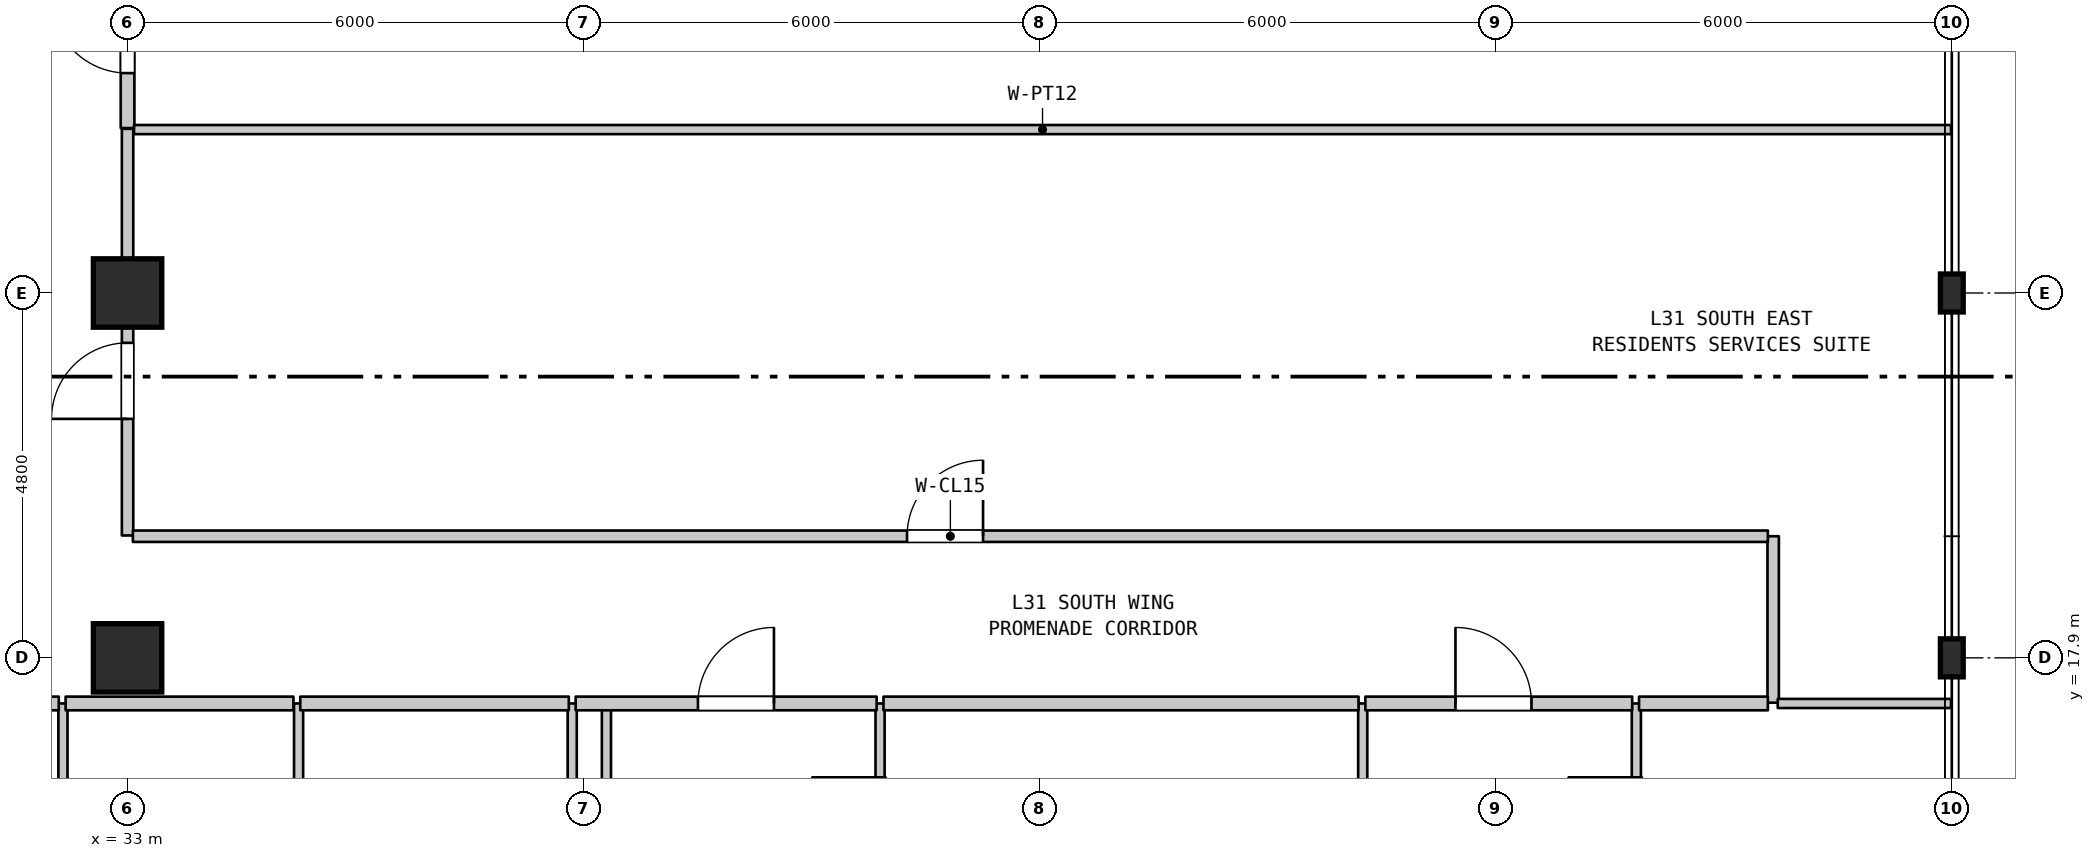
"""IFC4 building model, lengths in metres.
Left out: names, types, materials, properties, quantities, classifications, styles, units other than length and angle.
Written with IfcOpenShell. Run it as: python <this file> out.ifc"""

import sys

from ifc_helpers import new_model, si_unit, direction, frame, frame_2d, origin, origin_2d, place, context, subcontext, project, spatial, rectangle, i_section, extrude, element, fill, save


model = new_model("IFC4")
c1 = context("Model", 3, precision=1e-05, world=origin(), true_north=direction((0.0, 1.0)))
c2 = subcontext(c1, "Body", "Model", "MODEL_VIEW")
j1 = project(units=[si_unit("LENGTHUNIT", "METRE"), si_unit("PLANEANGLEUNIT", "RADIAN")], contexts=[c1])
p1 = place(None, origin())
s1 = spatial("IfcSite", under=j1, at=p1, CompositionType="ELEMENT")
p2 = place(p1, origin())
s2 = spatial("IfcBuilding", under=s1, at=p2, CompositionType="ELEMENT")
p3 = place(p2, frame((0.0, 0.0, 129.8)))
s3 = spatial("IfcBuildingStorey", under=s2, at=p3, CompositionType="ELEMENT", Elevation=129.8)
for number, where, z_axis, x_axis in (
    (1, (33.0, 17.9, 0.0), (0.0, 0.0, 1.0), (1.0, 0.0, 0.0)),
    (2, (33.0, 22.7, 0.0), (0.0, 0.0, 1.0), (1.0, 0.0, 0.0)),
):
    element("IfcColumn", number, at=place(p3, frame(where, z_axis=z_axis, x_axis=x_axis)), inside=s3, PredefinedType="COLUMN", context=c2, shape_type="SweptSolid", body=[
        extrude(rectangle(XDim=0.9, YDim=0.9, at=origin_2d()), origin(), (0.0, 0.0, 1.0), 3.7),
    ])
for number, where, z_axis, x_axis in (
    (3, (57.0, 17.9, 0.0), (0.0, 0.0, 1.0), (1.0, 0.0, 0.0)),
    (4, (57.0, 22.7, 0.0), (0.0, 0.0, 1.0), (1.0, 0.0, 0.0)),
):
    element("IfcColumn", number, at=place(p3, frame(where, z_axis=z_axis, x_axis=x_axis)), inside=s3, PredefinedType="COLUMN", context=c2, shape_type="SweptSolid", body=[
        extrude(i_section(OverallWidth=0.3, OverallDepth=0.5, WebThickness=0.014, FlangeThickness=0.028, FilletRadius=0.027, at=origin_2d()), origin(), (0.0, 0.0, 1.0), 3.7),
    ])
p4 = place(p3, frame((32.15, 11.15, 0.0), z_axis=(0.0, 0.0, 1.0), x_axis=(0.0, 1.0, 0.0)))
e5 = element("IfcWall", 5, at=p4, inside=s3, PredefinedType="PARTITIONING", context=c2, shape_type="SweptSolid", body=[
    extrude(rectangle(XDim=6.15, YDim=0.12, at=frame_2d((3.075, 0.0))), origin(), (0.0, 0.0, 1.0), 3.385),
])
p5 = place(p3, frame((33.0, 19.51, 0.0), z_axis=(0.0, 0.0, 1.0), x_axis=(0.0, 1.0, 0.0)))
e6 = element("IfcWall", 6, at=p5, inside=s3, PredefinedType="STANDARD", context=c2, shape_type="SweptSolid", body=[
    extrude(rectangle(XDim=5.35, YDim=0.15, at=frame_2d((2.675, 0.0))), origin(), (0.0, 0.0, 1.0), 2.935),
])
p6 = place(p5, frame((1.534, 0.0, 0.0)))
e7 = element("IfcOpeningElement", 7, at=p6, cuts=e6, PredefinedType="OPENING", context=c2, shape_type="SweptSolid", body=[
    extrude(rectangle(XDim=1.0, YDim=2.15, at=frame_2d((0.5, 1.075))), frame((0.0, 0.085, 0.0), z_axis=(0.0, -1.0, 0.0), x_axis=(1.0, 0.0, 0.0)), (0.0, 0.0, 1.0), 0.17),
])
p7 = place(p3, frame((33.0, 24.87, 0.0), z_axis=(0.0, 0.0, 1.0), x_axis=(0.0, 1.0, 0.0)))
e8 = element("IfcWall", 8, at=p7, inside=s3, PredefinedType="STANDARD", context=c2, shape_type="SweptSolid", body=[
    extrude(rectangle(XDim=2.6, YDim=0.18, at=frame_2d((1.3, 0.0))), origin(), (0.0, 0.0, 1.0), 2.935),
])
p8 = place(p7, frame((0.723, 0.0, 0.0)))
e9 = element("IfcOpeningElement", 9, at=p8, cuts=e8, PredefinedType="OPENING", context=c2, shape_type="SweptSolid", body=[
    extrude(rectangle(XDim=1.0, YDim=2.15, at=frame_2d((0.5, 1.075))), frame((0.0, 0.1, 0.0), z_axis=(0.0, -1.0, 0.0), x_axis=(1.0, 0.0, 0.0)), (0.0, 0.0, 1.0), 0.2),
])
for number, where, z_axis, x_axis in (
    (10, (35.25, 11.15, 0.0), (0.0, 0.0, 1.0), (0.0, 1.0, 0.0)),
    (11, (38.85, 11.15, 0.0), (0.0, 0.0, 1.0), (0.0, 1.0, 0.0)),
):
    element("IfcWall", number, at=place(p3, frame(where, z_axis=z_axis, x_axis=x_axis)), inside=s3, PredefinedType="PARTITIONING", context=c2, shape_type="SweptSolid", body=[
        extrude(rectangle(XDim=6.15, YDim=0.12, at=frame_2d((3.075, 0.0))), origin(), (0.0, 0.0, 1.0), 3.385),
    ])
p9 = place(p3, frame((39.3, 0.71, 0.0), z_axis=(0.0, 0.0, 1.0), x_axis=(0.0, 1.0, 0.0)))
e12 = element("IfcWall", 12, at=p9, inside=s3, PredefinedType="PARTITIONING", context=c2, shape_type="SweptSolid", body=[
    extrude(rectangle(XDim=16.59, YDim=0.12, at=frame_2d((8.295, 0.0))), origin(), (0.0, 0.0, 1.0), 3.385),
])
p10 = place(p3, frame((42.9, 14.6, 0.0), z_axis=(0.0, 0.0, 1.0), x_axis=(0.0, 1.0, 0.0)))
e13 = element("IfcWall", 13, at=p10, inside=s3, PredefinedType="PARTITIONING", context=c2, shape_type="SweptSolid", body=[
    extrude(rectangle(XDim=2.7, YDim=0.12, at=frame_2d((1.35, 0.0))), origin(), (0.0, 0.0, 1.0), 3.385),
])
p11 = place(p10, frame((0.828, 0.0, 0.0)))
e14 = element("IfcOpeningElement", 14, at=p11, cuts=e13, PredefinedType="OPENING", context=c2, shape_type="SweptSolid", body=[
    extrude(rectangle(XDim=0.9, YDim=2.1, at=frame_2d((0.45, 1.05))), frame((0.0, 0.07, 0.0), z_axis=(0.0, -1.0, 0.0), x_axis=(1.0, 0.0, 0.0)), (0.0, 0.0, 1.0), 0.14),
])
p12 = place(p3, frame((49.25, 14.6, 0.0), z_axis=(0.0, 0.0, 1.0), x_axis=(0.0, 1.0, 0.0)))
e15 = element("IfcWall", 15, at=p12, inside=s3, PredefinedType="PARTITIONING", context=c2, shape_type="SweptSolid", body=[
    extrude(rectangle(XDim=2.7, YDim=0.12, at=frame_2d((1.35, 0.0))), origin(), (0.0, 0.0, 1.0), 3.385),
])
p13 = place(p3, frame((52.85, 14.6, 0.0), z_axis=(0.0, 0.0, 1.0), x_axis=(0.0, 1.0, 0.0)))
e16 = element("IfcWall", 16, at=p13, inside=s3, PredefinedType="PARTITIONING", context=c2, shape_type="SweptSolid", body=[
    extrude(rectangle(XDim=2.7, YDim=0.12, at=frame_2d((1.35, 0.0))), origin(), (0.0, 0.0, 1.0), 3.385),
])
p14 = place(p13, frame((0.828, 0.0, 0.0)))
e17 = element("IfcOpeningElement", 17, at=p14, cuts=e16, PredefinedType="OPENING", context=c2, shape_type="SweptSolid", body=[
    extrude(rectangle(XDim=0.9, YDim=2.1, at=frame_2d((0.45, 1.05))), frame((0.0, 0.07, 0.0), z_axis=(0.0, -1.0, 0.0), x_axis=(1.0, 0.0, 0.0)), (0.0, 0.0, 1.0), 0.14),
])
p15 = place(p3, frame((54.65, 17.31, 0.0), z_axis=(0.0, 0.0, 1.0), x_axis=(0.0, 1.0, 0.0)))
e18 = element("IfcWall", 18, at=p15, inside=s3, PredefinedType="STANDARD", context=c2, shape_type="SweptSolid", body=[
    extrude(rectangle(XDim=2.19, YDim=0.15, at=frame_2d((1.095, 0.0))), origin(), (0.0, 0.0, 1.0), 3.385),
])
p16 = place(p3, frame((27.645, 17.3, 0.0), z_axis=(0.0, 0.0, 1.0), x_axis=(1.0, 0.0, 0.0)))
e19 = element("IfcWall", 19, at=p16, inside=s3, PredefinedType="STANDARD", context=c2, shape_type="SweptSolid", body=[
    extrude(rectangle(XDim=4.45, YDim=0.18, at=frame_2d((2.225, 0.0))), origin(), (0.0, 0.0, 1.0), 3.385),
])
p17 = place(p16, frame((1.653, 0.0, 0.0)))
e20 = element("IfcOpeningElement", 20, at=p17, cuts=e19, PredefinedType="OPENING", context=c2, shape_type="SweptSolid", body=[
    extrude(rectangle(XDim=1.0, YDim=2.15, at=frame_2d((0.5, 1.075))), frame((0.0, 0.1, 0.0), z_axis=(0.0, -1.0, 0.0), x_axis=(1.0, 0.0, 0.0)), (0.0, 0.0, 1.0), 0.2),
])
p18 = place(p3, frame((32.185, 17.3, 0.0), z_axis=(0.0, 0.0, 1.0), x_axis=(1.0, 0.0, 0.0)))
e21 = element("IfcWall", 21, at=p18, inside=s3, PredefinedType="STANDARD", context=c2, shape_type="SweptSolid", body=[
    extrude(rectangle(XDim=2.997, YDim=0.18, at=frame_2d((1.499, 0.0))), origin(), (0.0, 0.0, 1.0), 3.385),
])
p19 = place(p3, frame((35.272, 17.3, 0.0), z_axis=(0.0, 0.0, 1.0), x_axis=(1.0, 0.0, 0.0)))
e22 = element("IfcWall", 22, at=p19, inside=s3, PredefinedType="STANDARD", context=c2, shape_type="SweptSolid", body=[
    extrude(rectangle(XDim=3.533, YDim=0.18, at=frame_2d((1.767, 0.0))), origin(), (0.0, 0.0, 1.0), 3.385),
])
p20 = place(p3, frame((38.895, 17.3, 0.0), z_axis=(0.0, 0.0, 1.0), x_axis=(1.0, 0.0, 0.0)))
e23 = element("IfcWall", 23, at=p20, inside=s3, PredefinedType="STANDARD", context=c2, shape_type="SweptSolid", body=[
    extrude(rectangle(XDim=3.96, YDim=0.18, at=frame_2d((1.98, 0.0))), origin(), (0.0, 0.0, 1.0), 3.385),
])
p21 = place(p20, frame((1.609, 0.0, 0.0)))
e24 = element("IfcOpeningElement", 24, at=p21, cuts=e23, PredefinedType="OPENING", context=c2, shape_type="SweptSolid", body=[
    extrude(rectangle(XDim=1.0, YDim=2.15, at=frame_2d((0.5, 1.075))), frame((0.0, 0.1, 0.0), z_axis=(0.0, -1.0, 0.0), x_axis=(1.0, 0.0, 0.0)), (0.0, 0.0, 1.0), 0.2),
])
p22 = place(p3, frame((42.945, 17.3, 0.0), z_axis=(0.0, 0.0, 1.0), x_axis=(1.0, 0.0, 0.0)))
e25 = element("IfcWall", 25, at=p22, inside=s3, PredefinedType="STANDARD", context=c2, shape_type="SweptSolid", body=[
    extrude(rectangle(XDim=6.25, YDim=0.18, at=frame_2d((3.125, 0.0))), origin(), (0.0, 0.0, 1.0), 3.385),
])
p23 = place(p3, frame((49.285, 17.3, 0.0), z_axis=(0.0, 0.0, 1.0), x_axis=(1.0, 0.0, 0.0)))
e26 = element("IfcWall", 26, at=p23, inside=s3, PredefinedType="STANDARD", context=c2, shape_type="SweptSolid", body=[
    extrude(rectangle(XDim=3.51, YDim=0.18, at=frame_2d((1.755, 0.0))), origin(), (0.0, 0.0, 1.0), 3.385),
])
p24 = place(p23, frame((1.185, 0.0, 0.0)))
e27 = element("IfcOpeningElement", 27, at=p24, cuts=e26, PredefinedType="OPENING", context=c2, shape_type="SweptSolid", body=[
    extrude(rectangle(XDim=1.0, YDim=2.15, at=frame_2d((0.5, 1.075))), frame((0.0, 0.1, 0.0), z_axis=(0.0, -1.0, 0.0), x_axis=(1.0, 0.0, 0.0)), (0.0, 0.0, 1.0), 0.2),
])
p25 = place(p3, frame((52.885, 17.3, 0.0), z_axis=(0.0, 0.0, 1.0), x_axis=(1.0, 0.0, 0.0)))
e28 = element("IfcWall", 28, at=p25, inside=s3, PredefinedType="STANDARD", context=c2, shape_type="SweptSolid", body=[
    extrude(rectangle(XDim=1.695, YDim=0.18, at=frame_2d((0.848, 0.0))), origin(), (0.0, 0.0, 1.0), 3.385),
])
p26 = place(p3, frame((54.71, 17.3, 0.0), z_axis=(0.0, 0.0, 1.0), x_axis=(1.0, 0.0, 0.0)))
e29 = element("IfcWall", 29, at=p26, inside=s3, PredefinedType="PARTITIONING", context=c2, shape_type="SweptSolid", body=[
    extrude(rectangle(XDim=2.28, YDim=0.12, at=frame_2d((1.14, 0.0))), origin(), (0.0, 0.0, 1.0), 3.385),
])
p27 = place(p3, frame((33.07, 19.5, 0.0), z_axis=(0.0, 0.0, 1.0), x_axis=(1.0, 0.0, 0.0)))
e30 = element("IfcWall", 30, at=p27, inside=s3, PredefinedType="STANDARD", context=c2, shape_type="SweptSolid", body=[
    extrude(rectangle(XDim=21.51, YDim=0.15, at=frame_2d((10.755, 0.0))), origin(), (0.0, 0.0, 1.0), 3.385),
])
p28 = place(p27, frame((10.185, 0.0, 0.0)))
e31 = element("IfcOpeningElement", 31, at=p28, cuts=e30, PredefinedType="OPENING", context=c2, shape_type="SweptSolid", body=[
    extrude(rectangle(XDim=1.0, YDim=2.15, at=frame_2d((0.5, 1.075))), frame((0.0, 0.085, 0.0), z_axis=(0.0, -1.0, 0.0), x_axis=(1.0, 0.0, 0.0)), (0.0, 0.0, 1.0), 0.17),
])
p29 = place(p3, frame((33.085, 24.85, 0.0), z_axis=(0.0, 0.0, 1.0), x_axis=(1.0, 0.0, 0.0)))
e32 = element("IfcWall", 32, at=p29, inside=s3, PredefinedType="PARTITIONING", context=c2, shape_type="SweptSolid", body=[
    extrude(rectangle(XDim=23.905, YDim=0.12, at=frame_2d((11.953, 0.0))), origin(), (0.0, 0.0, 1.0), 3.385),
])
p30 = place(p6, origin())
e33 = element("IfcDoor", 33, at=p30, inside=s3, OperationType="SINGLE_SWING_LEFT", PredefinedType="DOOR", context=c2, shape_type="SweptSolid", body=[
    extrude(rectangle(XDim=1.0, YDim=2.15, at=frame_2d((0.5, 1.075))), frame((0.0, 0.025, 0.0), z_axis=(0.0, -1.0, 0.0), x_axis=(1.0, 0.0, 0.0)), (0.0, 0.0, 1.0), 0.05),
])
fill(e7, e33)
p31 = place(p8, origin())
e34 = element("IfcDoor", 34, at=p31, inside=s3, OperationType="SINGLE_SWING_RIGHT", PredefinedType="DOOR", context=c2, shape_type="SweptSolid", body=[
    extrude(rectangle(XDim=1.0, YDim=2.15, at=frame_2d((0.5, 1.075))), frame((0.0, 0.025, 0.0), z_axis=(0.0, -1.0, 0.0), x_axis=(1.0, 0.0, 0.0)), (0.0, 0.0, 1.0), 0.05),
])
fill(e9, e34)
p32 = place(p11, origin())
e35 = element("IfcDoor", 35, at=p32, inside=s3, OperationType="SINGLE_SWING_RIGHT", PredefinedType="DOOR", context=c2, shape_type="SweptSolid", body=[
    extrude(rectangle(XDim=0.9, YDim=2.1, at=frame_2d((0.45, 1.05))), frame((0.0, 0.025, 0.0), z_axis=(0.0, -1.0, 0.0), x_axis=(1.0, 0.0, 0.0)), (0.0, 0.0, 1.0), 0.05),
])
fill(e14, e35)
p33 = place(p14, origin())
e36 = element("IfcDoor", 36, at=p33, inside=s3, OperationType="SINGLE_SWING_RIGHT", PredefinedType="DOOR", context=c2, shape_type="SweptSolid", body=[
    extrude(rectangle(XDim=0.9, YDim=2.1, at=frame_2d((0.45, 1.05))), frame((0.0, 0.025, 0.0), z_axis=(0.0, -1.0, 0.0), x_axis=(1.0, 0.0, 0.0)), (0.0, 0.0, 1.0), 0.05),
])
fill(e17, e36)
p34 = place(p21, origin())
e37 = element("IfcDoor", 37, at=p34, inside=s3, OperationType="SINGLE_SWING_RIGHT", PredefinedType="DOOR", context=c2, shape_type="SweptSolid", body=[
    extrude(rectangle(XDim=1.0, YDim=2.15, at=frame_2d((0.5, 1.075))), frame((0.0, 0.025, 0.0), z_axis=(0.0, -1.0, 0.0), x_axis=(1.0, 0.0, 0.0)), (0.0, 0.0, 1.0), 0.05),
])
fill(e24, e37)
p35 = place(p24, origin())
e38 = element("IfcDoor", 38, at=p35, inside=s3, OperationType="SINGLE_SWING_LEFT", PredefinedType="DOOR", context=c2, shape_type="SweptSolid", body=[
    extrude(rectangle(XDim=1.0, YDim=2.15, at=frame_2d((0.5, 1.075))), frame((0.0, 0.025, 0.0), z_axis=(0.0, -1.0, 0.0), x_axis=(1.0, 0.0, 0.0)), (0.0, 0.0, 1.0), 0.05),
])
fill(e27, e38)
p36 = place(p28, origin())
e39 = element("IfcDoor", 39, at=p36, inside=s3, OperationType="SINGLE_SWING_RIGHT", PredefinedType="DOOR", context=c2, shape_type="SweptSolid", body=[
    extrude(rectangle(XDim=1.0, YDim=2.15, at=frame_2d((0.5, 1.075))), frame((0.0, 0.025, 0.0), z_axis=(0.0, -1.0, 0.0), x_axis=(1.0, 0.0, 0.0)), (0.0, 0.0, 1.0), 0.05),
])
fill(e31, e39)
save(model, sys.argv[1])
